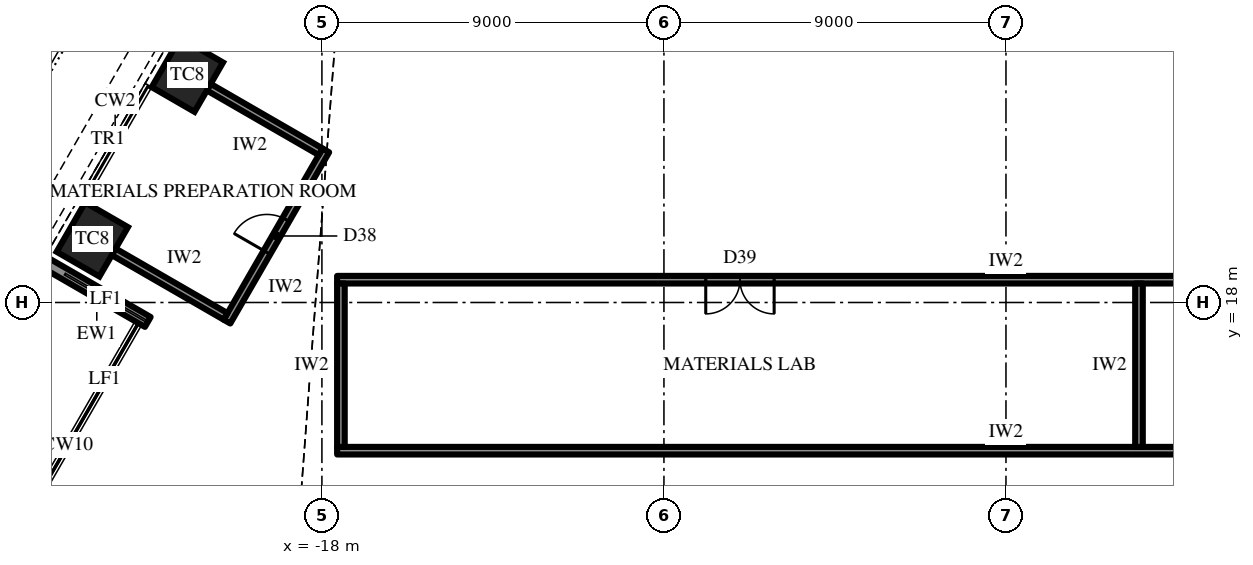
"""IFC4 building model, lengths in metres.
Left out: names, types, materials, properties, quantities, classifications, styles, units other than length and angle.
Written with IfcOpenShell. Run it as: python <this file> out.ifc"""

import sys

from ifc_helpers import new_model, si_unit, direction, frame, frame_2d, origin, origin_2d, place, context, subcontext, project, spatial, rectangle, extrude, element, fill, save


model = new_model("IFC4")
c1 = context("Model", 3, precision=1e-05, world=origin(), true_north=direction((0.0, 1.0)))
c2 = subcontext(c1, "Body", "Model", "MODEL_VIEW")
j1 = project(units=[si_unit("LENGTHUNIT", "METRE"), si_unit("PLANEANGLEUNIT", "RADIAN")], contexts=[c1])
p1 = place(None, origin())
s1 = spatial("IfcSite", under=j1, at=p1, CompositionType="ELEMENT")
p2 = place(p1, origin())
s2 = spatial("IfcBuilding", under=s1, at=p2, CompositionType="ELEMENT")
p3 = place(p2, frame((0.0, 0.0, 195.1)))
s3 = spatial("IfcBuildingStorey", under=s2, at=p3, CompositionType="ELEMENT", Elevation=195.1)
for number, where, z_axis, x_axis in (
    (1, (-21.54, 23.992, 0.0), (0.0, 0.0, 1.0), (-0.5, -0.866, 0.0)),
    (2, (-24.042, 19.658, 0.0), (0.0, 0.0, 1.0), (-0.5, -0.866, 0.0)),
):
    element("IfcColumn", number, at=place(p3, frame(where, z_axis=z_axis, x_axis=x_axis)), inside=s3, PredefinedType="COLUMN", context=c2, shape_type="SweptSolid", body=[
        extrude(rectangle(XDim=1.5, YDim=1.3, at=origin_2d()), origin(), (0.0, 0.0, 1.0), 4.2),
    ])
p4 = place(p3, frame((-25.266, 19.037, 0.0), z_axis=(0.0, 0.0, 1.0), x_axis=(0.86600983753, -0.500026960575, 0.0)))
e3 = element("IfcWall", 3, at=p4, inside=s3, PredefinedType="SOLIDWALL", context=c2, shape_type="SweptSolid", body=[
    extrude(rectangle(XDim=3.1, YDim=0.3, at=frame_2d((1.55, 0.0))), origin(), (0.0, 0.0, 1.0), 2.75),
])
p5 = place(p3, frame((-17.6, 14.1, 0.0), z_axis=(0.0, 0.0, 1.0), x_axis=(1.0, 0.0, 0.0)))
e4 = element("IfcWall", 4, at=p5, inside=s3, PredefinedType="PARTITIONING", context=c2, shape_type="SweptSolid", body=[
    extrude(rectangle(XDim=35.2, YDim=0.2, at=frame_2d((17.6, 0.0))), origin(), (0.0, 0.0, 1.0), 4.0),
])
p6 = place(p3, frame((-17.6, 18.6, 0.0), z_axis=(0.0, 0.0, 1.0), x_axis=(1.0, 0.0, 0.0)))
e5 = element("IfcWall", 5, at=p6, inside=s3, PredefinedType="PARTITIONING", context=c2, shape_type="SweptSolid", body=[
    extrude(rectangle(XDim=35.2, YDim=0.2, at=frame_2d((17.6, 0.0))), origin(), (0.0, 0.0, 1.0), 4.0),
])
p7 = place(p6, frame((9.7, 0.0, 0.0)))
e6 = element("IfcOpeningElement", 6, at=p7, cuts=e5, PredefinedType="OPENING", context=c2, shape_type="SweptSolid", body=[
    extrude(rectangle(XDim=1.8, YDim=2.4, at=frame_2d((0.9, 1.2))), frame((0.0, 0.11, 0.0), z_axis=(0.0, -1.0, 0.0), x_axis=(1.0, 0.0, 0.0)), (0.0, 0.0, 1.0), 0.22),
])
p8 = place(p6, frame((27.2, 0.0, 0.0)))
e7 = element("IfcOpeningElement", 7, at=p8, cuts=e5, PredefinedType="OPENING", context=c2, shape_type="SweptSolid", body=[
    extrude(rectangle(XDim=1.8, YDim=2.4, at=frame_2d((0.9, 1.2))), frame((0.0, 0.11, 0.0), z_axis=(0.0, -1.0, 0.0), x_axis=(1.0, 0.0, 0.0)), (0.0, 0.0, 1.0), 0.22),
])
for number, where, z_axis, x_axis in (
    (8, (-17.5, 14.2, 0.0), (0.0, 0.0, 1.0), (0.0, 1.0, 0.0)),
    (9, (3.5, 14.2, 0.0), (0.0, 0.0, 1.0), (0.0, 1.0, 0.0)),
):
    element("IfcWall", number, at=place(p3, frame(where, z_axis=z_axis, x_axis=x_axis)), inside=s3, PredefinedType="PARTITIONING", context=c2, shape_type="SweptSolid", body=[
        extrude(rectangle(XDim=4.3, YDim=0.2, at=frame_2d((2.15, 0.0))), origin(), (0.0, 0.0, 1.0), 4.0),
    ])
p9 = place(p3, frame((-17.896, 22.003, 0.0), z_axis=(0.0, 0.0, 1.0), x_axis=(-0.500009456303, -0.866019944116, 0.0)))
e10 = element("IfcWall", 10, at=p9, inside=s3, PredefinedType="PARTITIONING", context=c2, shape_type="SweptSolid", body=[
    extrude(rectangle(XDim=5.204, YDim=0.2, at=frame_2d((2.602, 0.0))), origin(), (0.0, 0.0, 1.0), 4.0),
])
p10 = place(p9, frame((2.102, 0.0, 0.0)))
e11 = element("IfcOpeningElement", 11, at=p10, cuts=e10, PredefinedType="OPENING", context=c2, shape_type="SweptSolid", body=[
    extrude(rectangle(XDim=1.0, YDim=2.2, at=frame_2d((0.5, 1.1))), frame((0.0, 0.11, 0.0), z_axis=(0.0, -1.0, 0.0), x_axis=(1.0, 0.0, 0.0)), (0.0, 0.0, 1.0), 0.22),
])
for number, where, z_axis, x_axis in (
    (12, (-18.032, 21.967, 0.0), (0.0, 0.0, 1.0), (-0.866, 0.5, 0.0)),
    (13, (-20.534, 17.633, 0.0), (0.0, 0.0, 1.0), (-0.866, 0.5, 0.0)),
):
    element("IfcWall", number, at=place(p3, frame(where, z_axis=z_axis, x_axis=x_axis)), inside=s3, PredefinedType="PARTITIONING", context=c2, shape_type="SweptSolid", body=[
        extrude(rectangle(XDim=3.4, YDim=0.2, at=frame_2d((1.7, 0.0))), origin(), (0.0, 0.0, 1.0), 3.082),
    ])
p11 = place(p7, frame((1.8, 0.0, 0.0), z_axis=(0.0, 0.0, 1.0), x_axis=(-1.0, 0.0, 0.0)))
e14 = element("IfcDoor", 14, at=p11, inside=s3, OperationType="DOUBLE_DOOR_SINGLE_SWING", PredefinedType="DOOR", context=c2, shape_type="SweptSolid", body=[
    extrude(rectangle(XDim=1.8, YDim=2.4, at=frame_2d((0.9, 1.2))), frame((0.0, 0.025, 0.0), z_axis=(0.0, -1.0, 0.0), x_axis=(1.0, 0.0, 0.0)), (0.0, 0.0, 1.0), 0.05),
])
fill(e6, e14)
p12 = place(p10, frame((1.0, 0.0, 0.0), z_axis=(0.0, 0.0, 1.0), x_axis=(-1.0, 0.0, 0.0)))
e15 = element("IfcDoor", 15, at=p12, inside=s3, OperationType="SINGLE_SWING_RIGHT", PredefinedType="DOOR", context=c2, shape_type="SweptSolid", body=[
    extrude(rectangle(XDim=1.0, YDim=2.2, at=frame_2d((0.5, 1.1))), frame((0.0, 0.025, 0.0), z_axis=(0.0, -1.0, 0.0), x_axis=(1.0, 0.0, 0.0)), (0.0, 0.0, 1.0), 0.05),
])
fill(e11, e15)
save(model, sys.argv[1])
